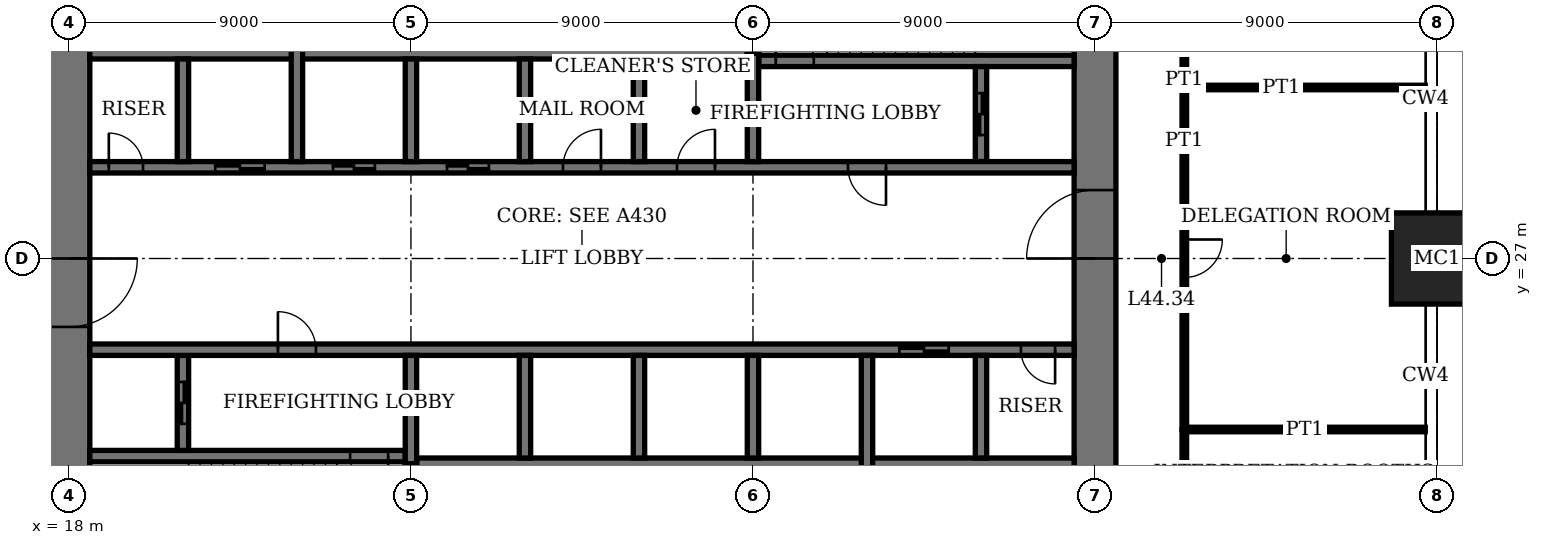
"""IFC4 building model, lengths in metres.
Left out: names, types, materials, properties, quantities, classifications, styles, units other than length and angle.
Written with IfcOpenShell. Run it as: python <this file> out.ifc"""

import sys

from ifc_helpers import new_model, si_unit, direction, frame, frame_2d, origin, origin_2d, place, context, subcontext, project, spatial, rectangle, extrude, element, fill, save


model = new_model("IFC4")
c1 = context("Model", 3, precision=1e-05, world=origin(), true_north=direction((0.0, 1.0)))
c2 = subcontext(c1, "Body", "Model", "MODEL_VIEW")
j1 = project(units=[si_unit("LENGTHUNIT", "METRE"), si_unit("PLANEANGLEUNIT", "RADIAN")], contexts=[c1])
p1 = place(None, origin())
s1 = spatial("IfcSite", under=j1, at=p1, CompositionType="ELEMENT")
p2 = place(p1, origin())
s2 = spatial("IfcBuilding", under=s1, at=p2, CompositionType="ELEMENT")
p3 = place(p2, frame((0.0, 0.0, 182.2)))
s3 = spatial("IfcBuildingStorey", under=s2, at=p3, CompositionType="ELEMENT", Elevation=182.2)
p4 = place(p3, frame((54.0, 27.0, 0.0), z_axis=(0.0, 0.0, 1.0), x_axis=(1.0, 0.0, 0.0)))
e1 = element("IfcColumn", 1, at=p4, inside=s3, PredefinedType="COLUMN", context=c2, shape_type="SweptSolid", body=[
    extrude(rectangle(XDim=2.4, YDim=2.4, at=origin_2d()), origin(), (0.0, 0.0, 1.0), 4.0),
])
p5 = place(p3, frame((18.0, 35.45, 0.0), z_axis=(0.0, 0.0, 1.0), x_axis=(0.0, -1.0, 0.0)))
e2 = element("IfcWall", 2, at=p5, inside=s3, PredefinedType="SHEAR", context=c2, shape_type="SweptSolid", body=[
    extrude(rectangle(XDim=16.9, YDim=1.1, at=frame_2d((8.45, 0.0))), origin(), (0.0, 0.0, 1.0), 4.0),
])
p6 = place(p5, frame((8.45, 0.0, 0.0)))
e3 = element("IfcOpeningElement", 3, at=p6, cuts=e2, PredefinedType="OPENING", context=c2, shape_type="SweptSolid", body=[
    extrude(rectangle(XDim=1.8, YDim=2.4, at=frame_2d((0.9, 1.2))), frame((0.0, 0.56, 0.0), z_axis=(0.0, -1.0, 0.0), x_axis=(1.0, 0.0, 0.0)), (0.0, 0.0, 1.0), 1.12),
])
p7 = place(p3, frame((45.0, 18.55, 0.0), z_axis=(0.0, 0.0, 1.0), x_axis=(0.0, 1.0, 0.0)))
e4 = element("IfcWall", 4, at=p7, inside=s3, PredefinedType="SHEAR", context=c2, shape_type="SweptSolid", body=[
    extrude(rectangle(XDim=16.9, YDim=1.1, at=frame_2d((8.45, 0.0))), origin(), (0.0, 0.0, 1.0), 4.0),
])
p8 = place(p7, frame((8.45, 0.0, 0.0)))
e5 = element("IfcOpeningElement", 5, at=p8, cuts=e4, PredefinedType="OPENING", context=c2, shape_type="SweptSolid", body=[
    extrude(rectangle(XDim=1.8, YDim=2.4, at=frame_2d((0.9, 1.2))), frame((0.0, 0.56, 0.0), z_axis=(0.0, -1.0, 0.0), x_axis=(1.0, 0.0, 0.0)), (0.0, 0.0, 1.0), 1.12),
])
p9 = place(p3, frame((18.55, 21.8, 0.0), z_axis=(0.0, 0.0, 1.0), x_axis=(1.0, 0.0, 0.0)))
e6 = element("IfcWall", 6, at=p9, inside=s3, PredefinedType="SHEAR", context=c2, shape_type="SweptSolid", body=[
    extrude(rectangle(XDim=8.3, YDim=0.3, at=frame_2d((4.15, 0.0))), origin(), (0.0, 0.0, 1.0), 4.0),
])
p10 = place(p9, frame((6.85, 0.0, 0.0)))
e7 = element("IfcOpeningElement", 7, at=p10, cuts=e6, PredefinedType="OPENING", context=c2, shape_type="SweptSolid", body=[
    extrude(rectangle(XDim=1.0, YDim=2.4, at=frame_2d((0.5, 1.2))), frame((0.0, 0.16, 0.0), z_axis=(0.0, -1.0, 0.0), x_axis=(1.0, 0.0, 0.0)), (0.0, 0.0, 1.0), 0.32),
])
p11 = place(p3, frame((36.15, 32.2, 0.0), z_axis=(0.0, 0.0, 1.0), x_axis=(1.0, 0.0, 0.0)))
e8 = element("IfcWall", 8, at=p11, inside=s3, PredefinedType="SHEAR", context=c2, shape_type="SweptSolid", body=[
    extrude(rectangle(XDim=8.3, YDim=0.3, at=frame_2d((4.15, 0.0))), origin(), (0.0, 0.0, 1.0), 4.0),
])
p12 = place(p11, frame((0.45, 0.0, 0.0)))
e9 = element("IfcOpeningElement", 9, at=p12, cuts=e8, PredefinedType="OPENING", context=c2, shape_type="SweptSolid", body=[
    extrude(rectangle(XDim=1.0, YDim=2.4, at=frame_2d((0.5, 1.2))), frame((0.0, 0.16, 0.0), z_axis=(0.0, -1.0, 0.0), x_axis=(1.0, 0.0, 0.0)), (0.0, 0.0, 1.0), 0.32),
])
for number, where, z_axis, x_axis in (
    (10, (27.0, 18.55, 0.0), (0.0, 0.0, 1.0), (0.0, 1.0, 0.0)),
    (11, (36.0, 32.4, 0.0), (0.0, 0.0, 1.0), (0.0, 1.0, 0.0)),
):
    element("IfcWall", number, at=place(p3, frame(where, z_axis=z_axis, x_axis=x_axis)), inside=s3, PredefinedType="SHEAR", context=c2, shape_type="SweptSolid", body=[
        extrude(rectangle(XDim=3.05, YDim=0.3, at=frame_2d((1.525, 0.0))), origin(), (0.0, 0.0, 1.0), 4.0),
    ])
p13 = place(p3, frame((21.0, 21.95, 0.0), z_axis=(0.0, 0.0, 1.0), x_axis=(0.0, 1.0, 0.0)))
e12 = element("IfcWall", 12, at=p13, inside=s3, PredefinedType="SHEAR", context=c2, shape_type="SweptSolid", body=[
    extrude(rectangle(XDim=2.5, YDim=0.3, at=frame_2d((1.25, 0.0))), origin(), (0.0, 0.0, 1.0), 4.0),
])
p14 = place(p13, frame((0.7, 0.0, 0.0)))
e13 = element("IfcOpeningElement", 13, at=p14, cuts=e12, PredefinedType="OPENING", context=c2, shape_type="SweptSolid", body=[
    extrude(rectangle(XDim=1.1, YDim=2.4, at=frame_2d((0.55, 1.2))), frame((0.0, 0.16, 0.0), z_axis=(0.0, -1.0, 0.0), x_axis=(1.0, 0.0, 0.0)), (0.0, 0.0, 1.0), 0.32),
])
p15 = place(p3, frame((42.0, 29.55, 0.0), z_axis=(0.0, 0.0, 1.0), x_axis=(0.0, 1.0, 0.0)))
e14 = element("IfcWall", 14, at=p15, inside=s3, PredefinedType="SHEAR", context=c2, shape_type="SweptSolid", body=[
    extrude(rectangle(XDim=2.5, YDim=0.3, at=frame_2d((1.25, 0.0))), origin(), (0.0, 0.0, 1.0), 4.0),
])
p16 = place(p15, frame((0.7, 0.0, 0.0)))
e15 = element("IfcOpeningElement", 15, at=p16, cuts=e14, PredefinedType="OPENING", context=c2, shape_type="SweptSolid", body=[
    extrude(rectangle(XDim=1.1, YDim=2.4, at=frame_2d((0.55, 1.2))), frame((0.0, 0.16, 0.0), z_axis=(0.0, -1.0, 0.0), x_axis=(1.0, 0.0, 0.0)), (0.0, 0.0, 1.0), 0.32),
])
p17 = place(p3, frame((18.55, 24.6, 0.0), z_axis=(0.0, 0.0, 1.0), x_axis=(1.0, 0.0, 0.0)))
e16 = element("IfcWall", 16, at=p17, inside=s3, PredefinedType="SHEAR", context=c2, shape_type="SweptSolid", body=[
    extrude(rectangle(XDim=25.9, YDim=0.3, at=frame_2d((12.95, 0.0))), origin(), (0.0, 0.0, 1.0), 4.0),
])
p18 = place(p17, frame((4.95, 0.0, 0.0)))
e17 = element("IfcOpeningElement", 17, at=p18, cuts=e16, PredefinedType="OPENING", context=c2, shape_type="SweptSolid", body=[
    extrude(rectangle(XDim=1.0, YDim=2.4, at=frame_2d((0.5, 1.2))), frame((0.0, 0.16, 0.0), z_axis=(0.0, -1.0, 0.0), x_axis=(1.0, 0.0, 0.0)), (0.0, 0.0, 1.0), 0.32),
])
p19 = place(p17, frame((24.5, 0.0, 0.0)))
e18 = element("IfcOpeningElement", 18, at=p19, cuts=e16, PredefinedType="OPENING", context=c2, shape_type="SweptSolid", body=[
    extrude(rectangle(XDim=0.9, YDim=2.1, at=frame_2d((0.45, 1.05))), frame((0.0, 0.16, 0.0), z_axis=(0.0, -1.0, 0.0), x_axis=(1.0, 0.0, 0.0)), (0.0, 0.0, 1.0), 0.32),
])
p20 = place(p17, frame((21.3, 0.0, 0.0)))
e19 = element("IfcOpeningElement", 19, at=p20, cuts=e16, PredefinedType="OPENING", context=c2, shape_type="SweptSolid", body=[
    extrude(rectangle(XDim=1.3, YDim=2.4, at=frame_2d((0.65, 1.2))), frame((0.0, 0.16, 0.0), z_axis=(0.0, -1.0, 0.0), x_axis=(1.0, 0.0, 0.0)), (0.0, 0.0, 1.0), 0.32),
])
p21 = place(p3, frame((18.55, 29.4, 0.0), z_axis=(0.0, 0.0, 1.0), x_axis=(1.0, 0.0, 0.0)))
e20 = element("IfcWall", 20, at=p21, inside=s3, PredefinedType="SHEAR", context=c2, shape_type="SweptSolid", body=[
    extrude(rectangle(XDim=25.9, YDim=0.3, at=frame_2d((12.95, 0.0))), origin(), (0.0, 0.0, 1.0), 4.0),
])
p22 = place(p21, frame((19.95, 0.0, 0.0)))
e21 = element("IfcOpeningElement", 21, at=p22, cuts=e20, PredefinedType="OPENING", context=c2, shape_type="SweptSolid", body=[
    extrude(rectangle(XDim=1.0, YDim=2.4, at=frame_2d((0.5, 1.2))), frame((0.0, 0.16, 0.0), z_axis=(0.0, -1.0, 0.0), x_axis=(1.0, 0.0, 0.0)), (0.0, 0.0, 1.0), 0.32),
])
p23 = place(p21, frame((0.5, 0.0, 0.0)))
e22 = element("IfcOpeningElement", 22, at=p23, cuts=e20, PredefinedType="OPENING", context=c2, shape_type="SweptSolid", body=[
    extrude(rectangle(XDim=0.9, YDim=2.1, at=frame_2d((0.45, 1.05))), frame((0.0, 0.16, 0.0), z_axis=(0.0, -1.0, 0.0), x_axis=(1.0, 0.0, 0.0)), (0.0, 0.0, 1.0), 0.32),
])
p24 = place(p21, frame((15.45, 0.0, 0.0)))
e23 = element("IfcOpeningElement", 23, at=p24, cuts=e20, PredefinedType="OPENING", context=c2, shape_type="SweptSolid", body=[
    extrude(rectangle(XDim=1.0, YDim=2.4, at=frame_2d((0.5, 1.2))), frame((0.0, 0.16, 0.0), z_axis=(0.0, -1.0, 0.0), x_axis=(1.0, 0.0, 0.0)), (0.0, 0.0, 1.0), 0.32),
])
p25 = place(p21, frame((12.45, 0.0, 0.0)))
e24 = element("IfcOpeningElement", 24, at=p25, cuts=e20, PredefinedType="OPENING", context=c2, shape_type="SweptSolid", body=[
    extrude(rectangle(XDim=1.0, YDim=2.4, at=frame_2d((0.5, 1.2))), frame((0.0, 0.16, 0.0), z_axis=(0.0, -1.0, 0.0), x_axis=(1.0, 0.0, 0.0)), (0.0, 0.0, 1.0), 0.32),
])
p26 = place(p21, frame((9.4, 0.0, 0.0)))
e25 = element("IfcOpeningElement", 25, at=p26, cuts=e20, PredefinedType="OPENING", context=c2, shape_type="SweptSolid", body=[
    extrude(rectangle(XDim=1.1, YDim=2.4, at=frame_2d((0.55, 1.2))), frame((0.0, 0.16, 0.0), z_axis=(0.0, -1.0, 0.0), x_axis=(1.0, 0.0, 0.0)), (0.0, 0.0, 1.0), 0.32),
])
p27 = place(p21, frame((6.4, 0.0, 0.0)))
e26 = element("IfcOpeningElement", 26, at=p27, cuts=e20, PredefinedType="OPENING", context=c2, shape_type="SweptSolid", body=[
    extrude(rectangle(XDim=1.1, YDim=2.4, at=frame_2d((0.55, 1.2))), frame((0.0, 0.16, 0.0), z_axis=(0.0, -1.0, 0.0), x_axis=(1.0, 0.0, 0.0)), (0.0, 0.0, 1.0), 0.32),
])
p28 = place(p21, frame((3.3, 0.0, 0.0)))
e27 = element("IfcOpeningElement", 27, at=p28, cuts=e20, PredefinedType="OPENING", context=c2, shape_type="SweptSolid", body=[
    extrude(rectangle(XDim=1.3, YDim=2.4, at=frame_2d((0.65, 1.2))), frame((0.0, 0.16, 0.0), z_axis=(0.0, -1.0, 0.0), x_axis=(1.0, 0.0, 0.0)), (0.0, 0.0, 1.0), 0.32),
])
for number, where, z_axis, x_axis in (
    (28, (27.15, 21.6, 0.0), (0.0, 0.0, 1.0), (1.0, 0.0, 0.0)),
    (29, (18.55, 32.4, 0.0), (0.0, 0.0, 1.0), (1.0, 0.0, 0.0)),
):
    element("IfcWall", number, at=place(p3, frame(where, z_axis=z_axis, x_axis=x_axis)), inside=s3, PredefinedType="SHEAR", context=c2, shape_type="SweptSolid", body=[
        extrude(rectangle(XDim=17.3, YDim=0.3, at=frame_2d((8.65, 0.0))), origin(), (0.0, 0.0, 1.0), 4.0),
    ])
for number, where, z_axis, x_axis in (
    (30, (30.0, 21.75, 0.0), (0.0, 0.0, 1.0), (0.0, 1.0, 0.0)),
    (31, (33.0, 29.55, 0.0), (0.0, 0.0, 1.0), (0.0, 1.0, 0.0)),
    (32, (33.0, 21.75, 0.0), (0.0, 0.0, 1.0), (0.0, 1.0, 0.0)),
    (33, (30.0, 29.55, 0.0), (0.0, 0.0, 1.0), (0.0, 1.0, 0.0)),
    (34, (36.0, 21.75, 0.0), (0.0, 0.0, 1.0), (0.0, 1.0, 0.0)),
    (35, (27.0, 29.55, 0.0), (0.0, 0.0, 1.0), (0.0, 1.0, 0.0)),
):
    element("IfcWall", number, at=place(p3, frame(where, z_axis=z_axis, x_axis=x_axis)), inside=s3, PredefinedType="SHEAR", context=c2, shape_type="SweptSolid", body=[
        extrude(rectangle(XDim=2.7, YDim=0.3, at=frame_2d((1.35, 0.0))), origin(), (0.0, 0.0, 1.0), 4.0),
    ])
for number, where, z_axis, x_axis in (
    (36, (39.0, 18.55, 0.0), (0.0, 0.0, 1.0), (0.0, 1.0, 0.0)),
    (37, (24.0, 29.55, 0.0), (0.0, 0.0, 1.0), (0.0, 1.0, 0.0)),
):
    element("IfcWall", number, at=place(p3, frame(where, z_axis=z_axis, x_axis=x_axis)), inside=s3, PredefinedType="SHEAR", context=c2, shape_type="SweptSolid", body=[
        extrude(rectangle(XDim=5.9, YDim=0.3, at=frame_2d((2.95, 0.0))), origin(), (0.0, 0.0, 1.0), 4.0),
    ])
for number, where, z_axis, x_axis in (
    (38, (42.0, 21.75, 0.0), (0.0, 0.0, 1.0), (0.0, 1.0, 0.0)),
    (39, (21.0, 29.55, 0.0), (0.0, 0.0, 1.0), (0.0, 1.0, 0.0)),
):
    element("IfcWall", number, at=place(p3, frame(where, z_axis=z_axis, x_axis=x_axis)), inside=s3, PredefinedType="SHEAR", context=c2, shape_type="SweptSolid", body=[
        extrude(rectangle(XDim=2.7, YDim=0.3, at=frame_2d((1.35, 0.0))), origin(), (0.0, 0.0, 1.0), 4.0),
    ])
for number, where, z_axis, x_axis in (
    (40, (27.0, 21.6, 0.0), (0.0, 0.0, 1.0), (0.0, 1.0, 0.0)),
    (41, (36.0, 29.55, 0.0), (0.0, 0.0, 1.0), (0.0, 1.0, 0.0)),
):
    element("IfcWall", number, at=place(p3, frame(where, z_axis=z_axis, x_axis=x_axis)), inside=s3, PredefinedType="SHEAR", context=c2, shape_type="SweptSolid", body=[
        extrude(rectangle(XDim=2.85, YDim=0.3, at=frame_2d((1.425, 0.0))), origin(), (0.0, 0.0, 1.0), 4.0),
    ])
for number, where, z_axis, x_axis in (
    (42, (47.35, 22.5, 0.0), (0.0, 0.0, 1.0), (1.0, 0.0, 0.0)),
    (43, (47.35, 31.5, 0.0), (0.0, 0.0, 1.0), (1.0, 0.0, 0.0)),
):
    element("IfcWall", number, at=place(p3, frame(where, z_axis=z_axis, x_axis=x_axis)), inside=s3, PredefinedType="PARTITIONING", context=c2, shape_type="SweptSolid", body=[
        extrude(rectangle(XDim=6.34, YDim=0.12, at=frame_2d((3.17, 0.0))), origin(), (0.0, 0.0, 1.0), 3.1),
    ])
p29 = place(p3, frame((47.35, 18.0, 0.0), z_axis=(0.0, 0.0, 1.0), x_axis=(0.0, 1.0, 0.0)))
e44 = element("IfcWall", 44, at=p29, inside=s3, PredefinedType="PARTITIONING", context=c2, shape_type="SweptSolid", body=[
    extrude(rectangle(XDim=4.5, YDim=0.12, at=frame_2d((2.25, 0.0))), origin(), (0.0, 0.0, 1.0), 3.75),
])
p30 = place(p29, frame((1.75, 0.0, 0.0)))
e45 = element("IfcOpeningElement", 45, at=p30, cuts=e44, PredefinedType="OPENING", context=c2, shape_type="SweptSolid", body=[
    extrude(rectangle(XDim=1.0, YDim=2.4, at=frame_2d((0.5, 1.2))), frame((0.0, 0.07, 0.0), z_axis=(0.0, -1.0, 0.0), x_axis=(1.0, 0.0, 0.0)), (0.0, 0.0, 1.0), 0.14),
])
p31 = place(p3, frame((47.35, 22.5, 0.0), z_axis=(0.0, 0.0, 1.0), x_axis=(0.0, 1.0, 0.0)))
e46 = element("IfcWall", 46, at=p31, inside=s3, PredefinedType="PARTITIONING", context=c2, shape_type="SweptSolid", body=[
    extrude(rectangle(XDim=9.0, YDim=0.12, at=frame_2d((4.5, 0.0))), origin(), (0.0, 0.0, 1.0), 3.75),
])
p32 = place(p31, frame((4.0, 0.0, 0.0)))
e47 = element("IfcOpeningElement", 47, at=p32, cuts=e46, PredefinedType="OPENING", context=c2, shape_type="SweptSolid", body=[
    extrude(rectangle(XDim=1.0, YDim=2.4, at=frame_2d((0.5, 1.2))), frame((0.0, 0.07, 0.0), z_axis=(0.0, -1.0, 0.0), x_axis=(1.0, 0.0, 0.0)), (0.0, 0.0, 1.0), 0.14),
])
p33 = place(p3, frame((47.35, 31.5, 0.0), z_axis=(0.0, 0.0, 1.0), x_axis=(0.0, 1.0, 0.0)))
e48 = element("IfcWall", 48, at=p33, inside=s3, PredefinedType="PARTITIONING", context=c2, shape_type="SweptSolid", body=[
    extrude(rectangle(XDim=4.5, YDim=0.12, at=frame_2d((2.25, 0.0))), origin(), (0.0, 0.0, 1.0), 3.75),
])
p34 = place(p33, frame((1.75, 0.0, 0.0)))
e49 = element("IfcOpeningElement", 49, at=p34, cuts=e48, PredefinedType="OPENING", context=c2, shape_type="SweptSolid", body=[
    extrude(rectangle(XDim=1.0, YDim=2.4, at=frame_2d((0.5, 1.2))), frame((0.0, 0.07, 0.0), z_axis=(0.0, -1.0, 0.0), x_axis=(1.0, 0.0, 0.0)), (0.0, 0.0, 1.0), 0.14),
])
p35 = place(p6, origin())
e50 = element("IfcDoor", 50, at=p35, inside=s3, OperationType="DOUBLE_DOOR_DOUBLE_SWING", PredefinedType="DOOR", context=c2, shape_type="SweptSolid", body=[
    extrude(rectangle(XDim=1.8, YDim=2.4, at=frame_2d((0.9, 1.2))), frame((0.0, 0.03, 0.0), z_axis=(0.0, -1.0, 0.0), x_axis=(1.0, 0.0, 0.0)), (0.0, 0.0, 1.0), 0.06),
    extrude(rectangle(XDim=0.04, YDim=2.4, at=frame_2d((0.02, 1.2))), frame((0.0, 0.55, 0.0), z_axis=(0.0, -1.0, 0.0), x_axis=(1.0, 0.0, 0.0)), (0.0, 0.0, 1.0), 1.1),
    extrude(rectangle(XDim=0.04, YDim=2.4, at=frame_2d((1.78, 1.2))), frame((0.0, 0.55, 0.0), z_axis=(0.0, -1.0, 0.0), x_axis=(1.0, 0.0, 0.0)), (0.0, 0.0, 1.0), 1.1),
    extrude(rectangle(XDim=1.8, YDim=0.04, at=frame_2d((0.9, 2.38))), frame((0.0, 0.55, 0.0), z_axis=(0.0, -1.0, 0.0), x_axis=(1.0, 0.0, 0.0)), (0.0, 0.0, 1.0), 1.1),
])
fill(e3, e50)
p36 = place(p8, origin())
e51 = element("IfcDoor", 51, at=p36, inside=s3, OperationType="DOUBLE_DOOR_DOUBLE_SWING", PredefinedType="DOOR", context=c2, shape_type="SweptSolid", body=[
    extrude(rectangle(XDim=1.8, YDim=2.4, at=frame_2d((0.9, 1.2))), frame((0.0, 0.03, 0.0), z_axis=(0.0, -1.0, 0.0), x_axis=(1.0, 0.0, 0.0)), (0.0, 0.0, 1.0), 0.06),
    extrude(rectangle(XDim=0.04, YDim=2.4, at=frame_2d((0.02, 1.2))), frame((0.0, 0.55, 0.0), z_axis=(0.0, -1.0, 0.0), x_axis=(1.0, 0.0, 0.0)), (0.0, 0.0, 1.0), 1.1),
    extrude(rectangle(XDim=0.04, YDim=2.4, at=frame_2d((1.78, 1.2))), frame((0.0, 0.55, 0.0), z_axis=(0.0, -1.0, 0.0), x_axis=(1.0, 0.0, 0.0)), (0.0, 0.0, 1.0), 1.1),
    extrude(rectangle(XDim=1.8, YDim=0.04, at=frame_2d((0.9, 2.38))), frame((0.0, 0.55, 0.0), z_axis=(0.0, -1.0, 0.0), x_axis=(1.0, 0.0, 0.0)), (0.0, 0.0, 1.0), 1.1),
])
fill(e5, e51)
p37 = place(p10, origin())
e52 = element("IfcDoor", 52, at=p37, inside=s3, OperationType="SINGLE_SWING_RIGHT", PredefinedType="DOOR", context=c2, shape_type="SweptSolid", body=[
    extrude(rectangle(XDim=1.0, YDim=2.4, at=frame_2d((0.5, 1.2))), frame((0.0, 0.03, 0.0), z_axis=(0.0, -1.0, 0.0), x_axis=(1.0, 0.0, 0.0)), (0.0, 0.0, 1.0), 0.06),
])
fill(e7, e52)
p38 = place(p12, origin())
e53 = element("IfcDoor", 53, at=p38, inside=s3, OperationType="SINGLE_SWING_RIGHT", PredefinedType="DOOR", context=c2, shape_type="SweptSolid", body=[
    extrude(rectangle(XDim=1.0, YDim=2.4, at=frame_2d((0.5, 1.2))), frame((0.0, 0.03, 0.0), z_axis=(0.0, -1.0, 0.0), x_axis=(1.0, 0.0, 0.0)), (0.0, 0.0, 1.0), 0.06),
])
fill(e9, e53)
p39 = place(p18, origin())
e54 = element("IfcDoor", 54, at=p39, inside=s3, OperationType="SINGLE_SWING_RIGHT", PredefinedType="DOOR", context=c2, shape_type="SweptSolid", body=[
    extrude(rectangle(XDim=1.0, YDim=2.4, at=frame_2d((0.5, 1.2))), frame((0.0, 0.03, 0.0), z_axis=(0.0, -1.0, 0.0), x_axis=(1.0, 0.0, 0.0)), (0.0, 0.0, 1.0), 0.06),
])
fill(e17, e54)
p40 = place(p22, origin())
e55 = element("IfcDoor", 55, at=p40, inside=s3, OperationType="SINGLE_SWING_RIGHT", PredefinedType="DOOR", context=c2, shape_type="SweptSolid", body=[
    extrude(rectangle(XDim=1.0, YDim=2.4, at=frame_2d((0.5, 1.2))), frame((0.0, 0.03, 0.0), z_axis=(0.0, -1.0, 0.0), x_axis=(1.0, 0.0, 0.0)), (0.0, 0.0, 1.0), 0.06),
])
fill(e21, e55)
p41 = place(p19, origin())
e56 = element("IfcDoor", 56, at=p41, inside=s3, OperationType="SINGLE_SWING_RIGHT", PredefinedType="DOOR", context=c2, shape_type="SweptSolid", body=[
    extrude(rectangle(XDim=0.9, YDim=2.1, at=frame_2d((0.45, 1.05))), frame((0.0, 0.03, 0.0), z_axis=(0.0, -1.0, 0.0), x_axis=(1.0, 0.0, 0.0)), (0.0, 0.0, 1.0), 0.06),
])
fill(e18, e56)
p42 = place(p23, origin())
e57 = element("IfcDoor", 57, at=p42, inside=s3, OperationType="SINGLE_SWING_RIGHT", PredefinedType="DOOR", context=c2, shape_type="SweptSolid", body=[
    extrude(rectangle(XDim=0.9, YDim=2.1, at=frame_2d((0.45, 1.05))), frame((0.0, 0.03, 0.0), z_axis=(0.0, -1.0, 0.0), x_axis=(1.0, 0.0, 0.0)), (0.0, 0.0, 1.0), 0.06),
])
fill(e22, e57)
p43 = place(p32, origin())
e58 = element("IfcDoor", 58, at=p43, inside=s3, OperationType="SINGLE_SWING_RIGHT", PredefinedType="DOOR", context=c2, shape_type="SweptSolid", body=[
    extrude(rectangle(XDim=1.0, YDim=2.4, at=frame_2d((0.5, 1.2))), frame((0.0, 0.025, 0.0), z_axis=(0.0, -1.0, 0.0), x_axis=(1.0, 0.0, 0.0)), (0.0, 0.0, 1.0), 0.05),
])
fill(e47, e58)
p44 = place(p24, origin())
e59 = element("IfcDoor", 59, at=p44, inside=s3, OperationType="SINGLE_SWING_LEFT", PredefinedType="DOOR", context=c2, shape_type="SweptSolid", body=[
    extrude(rectangle(XDim=1.0, YDim=2.4, at=frame_2d((0.5, 1.2))), frame((0.0, 0.03, 0.0), z_axis=(0.0, -1.0, 0.0), x_axis=(1.0, 0.0, 0.0)), (0.0, 0.0, 1.0), 0.06),
])
fill(e23, e59)
p45 = place(p25, origin())
e60 = element("IfcDoor", 60, at=p45, inside=s3, OperationType="SINGLE_SWING_LEFT", PredefinedType="DOOR", context=c2, shape_type="SweptSolid", body=[
    extrude(rectangle(XDim=1.0, YDim=2.4, at=frame_2d((0.5, 1.2))), frame((0.0, 0.03, 0.0), z_axis=(0.0, -1.0, 0.0), x_axis=(1.0, 0.0, 0.0)), (0.0, 0.0, 1.0), 0.06),
])
fill(e24, e60)
p46 = place(p26, origin())
e61 = element("IfcDoor", 61, at=p46, inside=s3, OperationType="DOUBLE_DOOR_SLIDING", PredefinedType="DOOR", context=c2, shape_type="SweptSolid", body=[
    extrude(rectangle(XDim=1.1, YDim=2.4, at=frame_2d((0.55, 1.2))), frame((0.0, 0.02, 0.0), z_axis=(0.0, -1.0, 0.0), x_axis=(1.0, 0.0, 0.0)), (0.0, 0.0, 1.0), 0.04),
])
fill(e25, e61)
p47 = place(p27, origin())
e62 = element("IfcDoor", 62, at=p47, inside=s3, OperationType="DOUBLE_DOOR_SLIDING", PredefinedType="DOOR", context=c2, shape_type="SweptSolid", body=[
    extrude(rectangle(XDim=1.1, YDim=2.4, at=frame_2d((0.55, 1.2))), frame((0.0, 0.02, 0.0), z_axis=(0.0, -1.0, 0.0), x_axis=(1.0, 0.0, 0.0)), (0.0, 0.0, 1.0), 0.04),
])
fill(e26, e62)
p48 = place(p20, origin())
e63 = element("IfcDoor", 63, at=p48, inside=s3, OperationType="DOUBLE_DOOR_SLIDING", PredefinedType="DOOR", context=c2, shape_type="SweptSolid", body=[
    extrude(rectangle(XDim=1.3, YDim=2.4, at=frame_2d((0.65, 1.2))), frame((0.0, 0.02, 0.0), z_axis=(0.0, -1.0, 0.0), x_axis=(1.0, 0.0, 0.0)), (0.0, 0.0, 1.0), 0.04),
])
fill(e19, e63)
p49 = place(p28, origin())
e64 = element("IfcDoor", 64, at=p49, inside=s3, OperationType="DOUBLE_DOOR_SLIDING", PredefinedType="DOOR", context=c2, shape_type="SweptSolid", body=[
    extrude(rectangle(XDim=1.3, YDim=2.4, at=frame_2d((0.65, 1.2))), frame((0.0, 0.02, 0.0), z_axis=(0.0, -1.0, 0.0), x_axis=(1.0, 0.0, 0.0)), (0.0, 0.0, 1.0), 0.04),
])
fill(e27, e64)
p50 = place(p14, origin())
e65 = element("IfcDoor", 65, at=p50, inside=s3, OperationType="DOUBLE_DOOR_SLIDING", PredefinedType="DOOR", context=c2, shape_type="SweptSolid", body=[
    extrude(rectangle(XDim=1.1, YDim=2.4, at=frame_2d((0.55, 1.2))), frame((0.0, 0.03, 0.0), z_axis=(0.0, -1.0, 0.0), x_axis=(1.0, 0.0, 0.0)), (0.0, 0.0, 1.0), 0.06),
])
fill(e13, e65)
p51 = place(p16, origin())
e66 = element("IfcDoor", 66, at=p51, inside=s3, OperationType="DOUBLE_DOOR_SLIDING", PredefinedType="DOOR", context=c2, shape_type="SweptSolid", body=[
    extrude(rectangle(XDim=1.1, YDim=2.4, at=frame_2d((0.55, 1.2))), frame((0.0, 0.03, 0.0), z_axis=(0.0, -1.0, 0.0), x_axis=(1.0, 0.0, 0.0)), (0.0, 0.0, 1.0), 0.06),
])
fill(e15, e66)
save(model, sys.argv[1])
